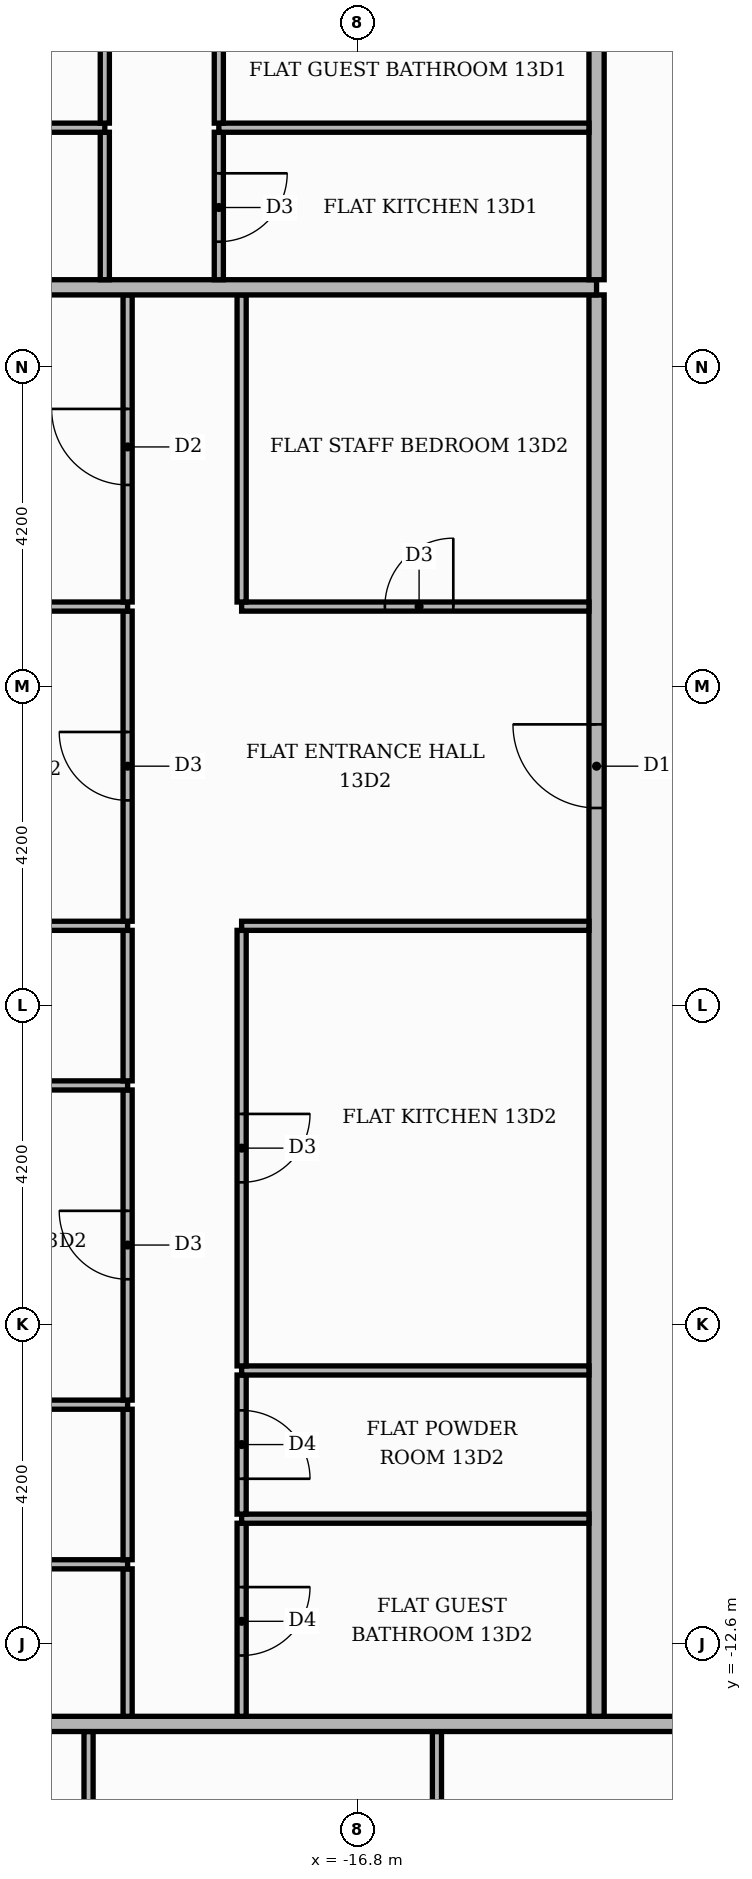
"""IFC4 building model, lengths in metres.
Left out: names, types, materials, properties, quantities, classifications, styles, units other than length and angle.
Written with IfcOpenShell. Run it as: python <this file> out.ifc"""

import sys

from ifc_helpers import new_model, si_unit, direction, frame, frame_2d, origin, place, context, subcontext, project, spatial, rectangle, extrude, element, fill, save


model = new_model("IFC4")
c1 = context("Model", 3, precision=1e-05, world=origin(), true_north=direction((0.0, 1.0)))
c2 = subcontext(c1, "Body", "Model", "MODEL_VIEW")
j1 = project(units=[si_unit("LENGTHUNIT", "METRE"), si_unit("PLANEANGLEUNIT", "RADIAN")], contexts=[c1])
p1 = place(None, origin())
s1 = spatial("IfcSite", under=j1, at=p1, CompositionType="ELEMENT")
p2 = place(p1, origin())
s2 = spatial("IfcBuilding", under=s1, at=p2, CompositionType="ELEMENT")
p3 = place(p2, frame((0.0, 0.0, 58.2)))
s3 = spatial("IfcBuildingStorey", under=s2, at=p3, CompositionType="ELEMENT", Elevation=58.2)
p4 = place(p3, frame((-20.334, -20.66, 0.0), z_axis=(0.0, 0.0, 1.0), x_axis=(0.0, 1.0, 0.0)))
e1 = element("IfcWall", 1, at=p4, inside=s3, PredefinedType="PARTITIONING", context=c2, shape_type="SweptSolid", body=[
    extrude(rectangle(XDim=6.91, YDim=0.12, at=frame_2d((3.455, 0.0))), origin(), (0.0, 0.0, 1.0), 3.48),
])
p5 = place(p4, frame((4.792, 0.0, 0.0)))
e2 = element("IfcOpeningElement", 2, at=p5, cuts=e1, PredefinedType="OPENING", context=c2, shape_type="SweptSolid", body=[
    extrude(rectangle(XDim=0.9, YDim=2.1, at=frame_2d((0.45, 1.05))), frame((0.0, 0.07, 0.0), z_axis=(0.0, -1.0, 0.0), x_axis=(1.0, 0.0, 0.0)), (0.0, 0.0, 1.0), 0.14),
])
p6 = place(p3, frame((-15.75, -20.66, 0.0), z_axis=(0.0, 0.0, 1.0), x_axis=(0.0, 1.0, 0.0)))
e3 = element("IfcWall", 3, at=p6, inside=s3, PredefinedType="PARTITIONING", context=c2, shape_type="SweptSolid", body=[
    extrude(rectangle(XDim=6.91, YDim=0.12, at=frame_2d((3.455, 0.0))), origin(), (0.0, 0.0, 1.0), 3.48),
])
p7 = place(p6, frame((2.975, 0.0, 0.0)))
e4 = element("IfcOpeningElement", 4, at=p7, cuts=e3, PredefinedType="OPENING", context=c2, shape_type="SweptSolid", body=[
    extrude(rectangle(XDim=1.0, YDim=2.1, at=frame_2d((0.5, 1.05))), frame((0.0, 0.07, 0.0), z_axis=(0.0, -1.0, 0.0), x_axis=(1.0, 0.0, 0.0)), (0.0, 0.0, 1.0), 0.14),
])
p8 = place(p3, frame((-25.42, -13.65, 0.0), z_axis=(0.0, 0.0, 1.0), x_axis=(1.0, 0.0, 0.0)))
e5 = element("IfcWall", 5, at=p8, inside=s3, PredefinedType="PARTITIONING", context=c2, shape_type="SweptSolid", body=[
    extrude(rectangle(XDim=39.07, YDim=0.2, at=frame_2d((19.535, 0.0))), origin(), (0.0, 0.0, 1.0), 3.48),
])
p9 = place(p8, frame((13.32, 0.0, 0.0)))
e6 = element("IfcOpeningElement", 6, at=p9, cuts=e5, PredefinedType="OPENING", context=c2, shape_type="SweptSolid", body=[
    extrude(rectangle(XDim=1.1, YDim=2.4, at=frame_2d((0.55, 1.2))), frame((0.0, 0.11, 0.0), z_axis=(0.0, -1.0, 0.0), x_axis=(1.0, 0.0, 0.0)), (0.0, 0.0, 1.0), 0.22),
])
p10 = place(p8, frame((25.92, 0.0, 0.0)))
e7 = element("IfcOpeningElement", 7, at=p10, cuts=e5, PredefinedType="OPENING", context=c2, shape_type="SweptSolid", body=[
    extrude(rectangle(XDim=1.1, YDim=2.4, at=frame_2d((0.55, 1.2))), frame((0.0, 0.11, 0.0), z_axis=(0.0, -1.0, 0.0), x_axis=(1.0, 0.0, 0.0)), (0.0, 0.0, 1.0), 0.22),
])
p11 = place(p3, frame((-19.82, -13.55, 0.0), z_axis=(0.0, 0.0, 1.0), x_axis=(0.0, 1.0, 0.0)))
e8 = element("IfcWall", 8, at=p11, inside=s3, PredefinedType="PARTITIONING", context=c2, shape_type="SweptSolid", body=[
    extrude(rectangle(XDim=1.94, YDim=0.12, at=frame_2d((0.97, 0.0))), origin(), (0.0, 0.0, 1.0), 3.48),
])
p12 = place(p3, frame((-18.32, -13.55, 0.0), z_axis=(0.0, 0.0, 1.0), x_axis=(0.0, 1.0, 0.0)))
e9 = element("IfcWall", 9, at=p12, inside=s3, PredefinedType="PARTITIONING", context=c2, shape_type="SweptSolid", body=[
    extrude(rectangle(XDim=2.54, YDim=0.12, at=frame_2d((1.27, 0.0))), origin(), (0.0, 0.0, 1.0), 3.48),
])
p13 = place(p12, frame((0.8, 0.0, 0.0)))
e10 = element("IfcOpeningElement", 10, at=p13, cuts=e9, PredefinedType="OPENING", context=c2, shape_type="SweptSolid", body=[
    extrude(rectangle(XDim=0.9, YDim=2.1, at=frame_2d((0.45, 1.05))), frame((0.0, 0.07, 0.0), z_axis=(0.0, -1.0, 0.0), x_axis=(1.0, 0.0, 0.0)), (0.0, 0.0, 1.0), 0.14),
])
p14 = place(p3, frame((-13.65, -13.55, 0.0), z_axis=(0.0, 0.0, 1.0), x_axis=(0.0, 1.0, 0.0)))
e11 = element("IfcWall", 11, at=p14, inside=s3, PredefinedType="PARTITIONING", context=c2, shape_type="SweptSolid", body=[
    extrude(rectangle(XDim=18.7, YDim=0.2, at=frame_2d((9.35, 0.0))), origin(), (0.0, 0.0, 1.0), 3.48),
])
p15 = place(p14, frame((11.95, 0.0, 0.0)))
e12 = element("IfcOpeningElement", 12, at=p15, cuts=e11, PredefinedType="OPENING", context=c2, shape_type="SweptSolid", body=[
    extrude(rectangle(XDim=1.1, YDim=2.4, at=frame_2d((0.55, 1.2))), frame((0.0, 0.11, 0.0), z_axis=(0.0, -1.0, 0.0), x_axis=(1.0, 0.0, 0.0)), (0.0, 0.0, 1.0), 0.22),
])
p16 = place(p3, frame((-25.42, -11.55, 0.0), z_axis=(0.0, 0.0, 1.0), x_axis=(1.0, 0.0, 0.0)))
e13 = element("IfcWall", 13, at=p16, inside=s3, PredefinedType="PARTITIONING", context=c2, shape_type="SweptSolid", body=[
    extrude(rectangle(XDim=5.6, YDim=0.12, at=frame_2d((2.8, 0.0))), origin(), (0.0, 0.0, 1.0), 3.48),
])
p17 = place(p16, frame((2.2, 0.0, 0.0)))
e14 = element("IfcOpeningElement", 14, at=p17, cuts=e13, PredefinedType="OPENING", context=c2, shape_type="SweptSolid", body=[
    extrude(rectangle(XDim=0.9, YDim=2.1, at=frame_2d((0.45, 1.05))), frame((0.0, 0.07, 0.0), z_axis=(0.0, -1.0, 0.0), x_axis=(1.0, 0.0, 0.0)), (0.0, 0.0, 1.0), 0.14),
])
p18 = place(p3, frame((-19.82, -11.49, 0.0), z_axis=(0.0, 0.0, 1.0), x_axis=(0.0, 1.0, 0.0)))
e15 = element("IfcWall", 15, at=p18, inside=s3, PredefinedType="PARTITIONING", context=c2, shape_type="SweptSolid", body=[
    extrude(rectangle(XDim=1.98, YDim=0.12, at=frame_2d((0.99, 0.0))), origin(), (0.0, 0.0, 1.0), 3.48),
])
p19 = place(p3, frame((-18.32, -10.95, 0.0), z_axis=(0.0, 0.0, 1.0), x_axis=(1.0, 0.0, 0.0)))
e16 = element("IfcWall", 16, at=p19, inside=s3, PredefinedType="PARTITIONING", context=c2, shape_type="SweptSolid", body=[
    extrude(rectangle(XDim=4.57, YDim=0.12, at=frame_2d((2.285, 0.0))), origin(), (0.0, 0.0, 1.0), 3.48),
])
p20 = place(p3, frame((-18.32, -10.89, 0.0), z_axis=(0.0, 0.0, 1.0), x_axis=(0.0, 1.0, 0.0)))
e17 = element("IfcWall", 17, at=p20, inside=s3, PredefinedType="PARTITIONING", context=c2, shape_type="SweptSolid", body=[
    extrude(rectangle(XDim=1.83, YDim=0.12, at=frame_2d((0.915, 0.0))), origin(), (0.0, 0.0, 1.0), 3.48),
])
p21 = place(p20, frame((0.465, 0.0, 0.0)))
e18 = element("IfcOpeningElement", 18, at=p21, cuts=e17, PredefinedType="OPENING", context=c2, shape_type="SweptSolid", body=[
    extrude(rectangle(XDim=0.9, YDim=2.1, at=frame_2d((0.45, 1.05))), frame((0.0, 0.07, 0.0), z_axis=(0.0, -1.0, 0.0), x_axis=(1.0, 0.0, 0.0)), (0.0, 0.0, 1.0), 0.14),
])
p22 = place(p3, frame((-25.42, -9.45, 0.0), z_axis=(0.0, 0.0, 1.0), x_axis=(1.0, 0.0, 0.0)))
e19 = element("IfcWall", 19, at=p22, inside=s3, PredefinedType="PARTITIONING", context=c2, shape_type="SweptSolid", body=[
    extrude(rectangle(XDim=5.6, YDim=0.12, at=frame_2d((2.8, 0.0))), origin(), (0.0, 0.0, 1.0), 3.48),
])
p23 = place(p22, frame((2.2, 0.0, 0.0)))
e20 = element("IfcOpeningElement", 20, at=p23, cuts=e19, PredefinedType="OPENING", context=c2, shape_type="SweptSolid", body=[
    extrude(rectangle(XDim=0.9, YDim=2.1, at=frame_2d((0.45, 1.05))), frame((0.0, 0.07, 0.0), z_axis=(0.0, -1.0, 0.0), x_axis=(1.0, 0.0, 0.0)), (0.0, 0.0, 1.0), 0.14),
])
p24 = place(p3, frame((-19.82, -9.39, 0.0), z_axis=(0.0, 0.0, 1.0), x_axis=(0.0, 1.0, 0.0)))
e21 = element("IfcWall", 21, at=p24, inside=s3, PredefinedType="PARTITIONING", context=c2, shape_type="SweptSolid", body=[
    extrude(rectangle(XDim=4.08, YDim=0.12, at=frame_2d((2.04, 0.0))), origin(), (0.0, 0.0, 1.0), 3.48),
])
p25 = place(p24, frame((1.59, 0.0, 0.0)))
e22 = element("IfcOpeningElement", 22, at=p25, cuts=e21, PredefinedType="OPENING", context=c2, shape_type="SweptSolid", body=[
    extrude(rectangle(XDim=0.9, YDim=2.1, at=frame_2d((0.45, 1.05))), frame((0.0, 0.07, 0.0), z_axis=(0.0, -1.0, 0.0), x_axis=(1.0, 0.0, 0.0)), (0.0, 0.0, 1.0), 0.14),
])
p26 = place(p3, frame((-18.32, -9.0, 0.0), z_axis=(0.0, 0.0, 1.0), x_axis=(1.0, 0.0, 0.0)))
e23 = element("IfcWall", 23, at=p26, inside=s3, PredefinedType="PARTITIONING", context=c2, shape_type="SweptSolid", body=[
    extrude(rectangle(XDim=4.57, YDim=0.12, at=frame_2d((2.285, 0.0))), origin(), (0.0, 0.0, 1.0), 3.48),
])
p27 = place(p3, frame((-18.32, -8.94, 0.0), z_axis=(0.0, 0.0, 1.0), x_axis=(0.0, 1.0, 0.0)))
e24 = element("IfcWall", 24, at=p27, inside=s3, PredefinedType="PARTITIONING", context=c2, shape_type="SweptSolid", body=[
    extrude(rectangle(XDim=5.73, YDim=0.12, at=frame_2d((2.865, 0.0))), origin(), (0.0, 0.0, 1.0), 3.48),
])
p28 = place(p27, frame((2.415, 0.0, 0.0)))
e25 = element("IfcOpeningElement", 25, at=p28, cuts=e24, PredefinedType="OPENING", context=c2, shape_type="SweptSolid", body=[
    extrude(rectangle(XDim=0.9, YDim=2.1, at=frame_2d((0.45, 1.05))), frame((0.0, 0.07, 0.0), z_axis=(0.0, -1.0, 0.0), x_axis=(1.0, 0.0, 0.0)), (0.0, 0.0, 1.0), 0.14),
])
p29 = place(p3, frame((-25.42, -5.25, 0.0), z_axis=(0.0, 0.0, 1.0), x_axis=(1.0, 0.0, 0.0)))
e26 = element("IfcWall", 26, at=p29, inside=s3, PredefinedType="PARTITIONING", context=c2, shape_type="SweptSolid", body=[
    extrude(rectangle(XDim=5.6, YDim=0.12, at=frame_2d((2.8, 0.0))), origin(), (0.0, 0.0, 1.0), 3.48),
])
p30 = place(p3, frame((-19.82, -5.19, 0.0), z_axis=(0.0, 0.0, 1.0), x_axis=(0.0, 1.0, 0.0)))
e27 = element("IfcWall", 27, at=p30, inside=s3, PredefinedType="PARTITIONING", context=c2, shape_type="SweptSolid", body=[
    extrude(rectangle(XDim=1.98, YDim=0.12, at=frame_2d((0.99, 0.0))), origin(), (0.0, 0.0, 1.0), 3.48),
])
p31 = place(p3, frame((-25.42, -3.15, 0.0), z_axis=(0.0, 0.0, 1.0), x_axis=(1.0, 0.0, 0.0)))
e28 = element("IfcWall", 28, at=p31, inside=s3, PredefinedType="PARTITIONING", context=c2, shape_type="SweptSolid", body=[
    extrude(rectangle(XDim=5.6, YDim=0.12, at=frame_2d((2.8, 0.0))), origin(), (0.0, 0.0, 1.0), 3.48),
])
p32 = place(p31, frame((2.2, 0.0, 0.0)))
e29 = element("IfcOpeningElement", 29, at=p32, cuts=e28, PredefinedType="OPENING", context=c2, shape_type="SweptSolid", body=[
    extrude(rectangle(XDim=0.9, YDim=2.1, at=frame_2d((0.45, 1.05))), frame((0.0, 0.07, 0.0), z_axis=(0.0, -1.0, 0.0), x_axis=(1.0, 0.0, 0.0)), (0.0, 0.0, 1.0), 0.14),
])
p33 = place(p3, frame((-18.32, -3.15, 0.0), z_axis=(0.0, 0.0, 1.0), x_axis=(1.0, 0.0, 0.0)))
e30 = element("IfcWall", 30, at=p33, inside=s3, PredefinedType="PARTITIONING", context=c2, shape_type="SweptSolid", body=[
    extrude(rectangle(XDim=4.57, YDim=0.12, at=frame_2d((2.285, 0.0))), origin(), (0.0, 0.0, 1.0), 3.48),
])
p34 = place(p3, frame((-19.82, -3.09, 0.0), z_axis=(0.0, 0.0, 1.0), x_axis=(0.0, 1.0, 0.0)))
e31 = element("IfcWall", 31, at=p34, inside=s3, PredefinedType="PARTITIONING", context=c2, shape_type="SweptSolid", body=[
    extrude(rectangle(XDim=4.08, YDim=0.12, at=frame_2d((2.04, 0.0))), origin(), (0.0, 0.0, 1.0), 3.48),
])
p35 = place(p34, frame((1.59, 0.0, 0.0)))
e32 = element("IfcOpeningElement", 32, at=p35, cuts=e31, PredefinedType="OPENING", context=c2, shape_type="SweptSolid", body=[
    extrude(rectangle(XDim=0.9, YDim=2.1, at=frame_2d((0.45, 1.05))), frame((0.0, 0.07, 0.0), z_axis=(0.0, -1.0, 0.0), x_axis=(1.0, 0.0, 0.0)), (0.0, 0.0, 1.0), 0.14),
])
p36 = place(p3, frame((-25.42, 1.05, 0.0), z_axis=(0.0, 0.0, 1.0), x_axis=(1.0, 0.0, 0.0)))
e33 = element("IfcWall", 33, at=p36, inside=s3, PredefinedType="PARTITIONING", context=c2, shape_type="SweptSolid", body=[
    extrude(rectangle(XDim=5.6, YDim=0.12, at=frame_2d((2.8, 0.0))), origin(), (0.0, 0.0, 1.0), 3.48),
])
p37 = place(p3, frame((-18.32, 1.05, 0.0), z_axis=(0.0, 0.0, 1.0), x_axis=(1.0, 0.0, 0.0)))
e34 = element("IfcWall", 34, at=p37, inside=s3, PredefinedType="PARTITIONING", context=c2, shape_type="SweptSolid", body=[
    extrude(rectangle(XDim=4.57, YDim=0.12, at=frame_2d((2.285, 0.0))), origin(), (0.0, 0.0, 1.0), 3.48),
])
p38 = place(p37, frame((1.885, 0.0, 0.0)))
e35 = element("IfcOpeningElement", 35, at=p38, cuts=e34, PredefinedType="OPENING", context=c2, shape_type="SweptSolid", body=[
    extrude(rectangle(XDim=0.9, YDim=2.1, at=frame_2d((0.45, 1.05))), frame((0.0, 0.07, 0.0), z_axis=(0.0, -1.0, 0.0), x_axis=(1.0, 0.0, 0.0)), (0.0, 0.0, 1.0), 0.14),
])
p39 = place(p3, frame((-19.82, 1.11, 0.0), z_axis=(0.0, 0.0, 1.0), x_axis=(0.0, 1.0, 0.0)))
e36 = element("IfcWall", 36, at=p39, inside=s3, PredefinedType="PARTITIONING", context=c2, shape_type="SweptSolid", body=[
    extrude(rectangle(XDim=4.04, YDim=0.12, at=frame_2d((2.02, 0.0))), origin(), (0.0, 0.0, 1.0), 3.48),
])
p40 = place(p39, frame((1.54, 0.0, 0.0)))
e37 = element("IfcOpeningElement", 37, at=p40, cuts=e36, PredefinedType="OPENING", context=c2, shape_type="SweptSolid", body=[
    extrude(rectangle(XDim=1.0, YDim=2.1, at=frame_2d((0.5, 1.05))), frame((0.0, 0.07, 0.0), z_axis=(0.0, -1.0, 0.0), x_axis=(1.0, 0.0, 0.0)), (0.0, 0.0, 1.0), 0.14),
])
p41 = place(p3, frame((-18.32, 1.11, 0.0), z_axis=(0.0, 0.0, 1.0), x_axis=(0.0, 1.0, 0.0)))
e38 = element("IfcWall", 38, at=p41, inside=s3, PredefinedType="PARTITIONING", context=c2, shape_type="SweptSolid", body=[
    extrude(rectangle(XDim=4.04, YDim=0.12, at=frame_2d((2.02, 0.0))), origin(), (0.0, 0.0, 1.0), 3.48),
])
p42 = place(p3, frame((-25.42, 5.25, 0.0), z_axis=(0.0, 0.0, 1.0), x_axis=(1.0, 0.0, 0.0)))
e39 = element("IfcWall", 39, at=p42, inside=s3, PredefinedType="PARTITIONING", context=c2, shape_type="SweptSolid", body=[
    extrude(rectangle(XDim=11.77, YDim=0.2, at=frame_2d((5.885, 0.0))), origin(), (0.0, 0.0, 1.0), 3.48),
])
p43 = place(p3, frame((-20.12, 5.35, 0.0), z_axis=(0.0, 0.0, 1.0), x_axis=(0.0, 1.0, 0.0)))
e40 = element("IfcWall", 40, at=p43, inside=s3, PredefinedType="PARTITIONING", context=c2, shape_type="SweptSolid", body=[
    extrude(rectangle(XDim=1.94, YDim=0.12, at=frame_2d((0.97, 0.0))), origin(), (0.0, 0.0, 1.0), 3.48),
])
p44 = place(p3, frame((-18.62, 5.35, 0.0), z_axis=(0.0, 0.0, 1.0), x_axis=(0.0, 1.0, 0.0)))
e41 = element("IfcWall", 41, at=p44, inside=s3, PredefinedType="PARTITIONING", context=c2, shape_type="SweptSolid", body=[
    extrude(rectangle(XDim=1.94, YDim=0.12, at=frame_2d((0.97, 0.0))), origin(), (0.0, 0.0, 1.0), 3.48),
])
p45 = place(p44, frame((0.5, 0.0, 0.0)))
e42 = element("IfcOpeningElement", 42, at=p45, cuts=e41, PredefinedType="OPENING", context=c2, shape_type="SweptSolid", body=[
    extrude(rectangle(XDim=0.9, YDim=2.1, at=frame_2d((0.45, 1.05))), frame((0.0, 0.07, 0.0), z_axis=(0.0, -1.0, 0.0), x_axis=(1.0, 0.0, 0.0)), (0.0, 0.0, 1.0), 0.14),
])
p46 = place(p3, frame((-13.65, 5.35, 0.0), z_axis=(0.0, 0.0, 1.0), x_axis=(0.0, 1.0, 0.0)))
e43 = element("IfcWall", 43, at=p46, inside=s3, PredefinedType="PARTITIONING", context=c2, shape_type="SweptSolid", body=[
    extrude(rectangle(XDim=8.2, YDim=0.2, at=frame_2d((4.1, 0.0))), origin(), (0.0, 0.0, 1.0), 3.48),
])
p47 = place(p46, frame((5.65, 0.0, 0.0)))
e44 = element("IfcOpeningElement", 44, at=p47, cuts=e43, PredefinedType="OPENING", context=c2, shape_type="SweptSolid", body=[
    extrude(rectangle(XDim=1.1, YDim=2.4, at=frame_2d((0.55, 1.2))), frame((0.0, 0.11, 0.0), z_axis=(0.0, -1.0, 0.0), x_axis=(1.0, 0.0, 0.0)), (0.0, 0.0, 1.0), 0.22),
])
p48 = place(p3, frame((-25.42, 7.35, 0.0), z_axis=(0.0, 0.0, 1.0), x_axis=(1.0, 0.0, 0.0)))
e45 = element("IfcWall", 45, at=p48, inside=s3, PredefinedType="PARTITIONING", context=c2, shape_type="SweptSolid", body=[
    extrude(rectangle(XDim=5.3, YDim=0.12, at=frame_2d((2.65, 0.0))), origin(), (0.0, 0.0, 1.0), 3.48),
])
p49 = place(p48, frame((2.05, 0.0, 0.0)))
e46 = element("IfcOpeningElement", 46, at=p49, cuts=e45, PredefinedType="OPENING", context=c2, shape_type="SweptSolid", body=[
    extrude(rectangle(XDim=0.9, YDim=2.1, at=frame_2d((0.45, 1.05))), frame((0.0, 0.07, 0.0), z_axis=(0.0, -1.0, 0.0), x_axis=(1.0, 0.0, 0.0)), (0.0, 0.0, 1.0), 0.14),
])
p50 = place(p3, frame((-18.62, 7.35, 0.0), z_axis=(0.0, 0.0, 1.0), x_axis=(1.0, 0.0, 0.0)))
e47 = element("IfcWall", 47, at=p50, inside=s3, PredefinedType="PARTITIONING", context=c2, shape_type="SweptSolid", body=[
    extrude(rectangle(XDim=4.87, YDim=0.12, at=frame_2d((2.435, 0.0))), origin(), (0.0, 0.0, 1.0), 3.48),
])
for number, where, z_axis, x_axis in (
    (48, (-20.12, 7.41, 0.0), (0.0, 0.0, 1.0), (0.0, 1.0, 0.0)),
    (49, (-18.62, 7.41, 0.0), (0.0, 0.0, 1.0), (0.0, 1.0, 0.0)),
):
    element("IfcWall", number, at=place(p3, frame(where, z_axis=z_axis, x_axis=x_axis)), inside=s3, PredefinedType="PARTITIONING", context=c2, shape_type="SweptSolid", body=[
        extrude(rectangle(XDim=1.98, YDim=0.12, at=frame_2d((0.99, 0.0))), origin(), (0.0, 0.0, 1.0), 3.48),
    ])
p51 = place(p45, frame((0.9, 0.0, 0.0), z_axis=(0.0, 0.0, 1.0), x_axis=(-1.0, 0.0, 0.0)))
e50 = element("IfcDoor", 50, at=p51, inside=s3, OperationType="SINGLE_SWING_RIGHT", PredefinedType="DOOR", context=c2, shape_type="SweptSolid", body=[
    extrude(rectangle(XDim=0.9, YDim=2.1, at=frame_2d((0.45, 1.05))), frame((0.0, 0.025, 0.0), z_axis=(0.0, -1.0, 0.0), x_axis=(1.0, 0.0, 0.0)), (0.0, 0.0, 1.0), 0.05),
])
fill(e42, e50)
p52 = place(p15, origin())
e51 = element("IfcDoor", 51, at=p52, inside=s3, OperationType="SINGLE_SWING_RIGHT", PredefinedType="DOOR", context=c2, shape_type="SweptSolid", body=[
    extrude(rectangle(XDim=1.1, YDim=2.4, at=frame_2d((0.55, 1.2))), frame((0.0, 0.025, 0.0), z_axis=(0.0, -1.0, 0.0), x_axis=(1.0, 0.0, 0.0)), (0.0, 0.0, 1.0), 0.05),
])
fill(e12, e51)
p53 = place(p38, origin())
e52 = element("IfcDoor", 52, at=p53, inside=s3, OperationType="SINGLE_SWING_RIGHT", PredefinedType="DOOR", context=c2, shape_type="SweptSolid", body=[
    extrude(rectangle(XDim=0.9, YDim=2.1, at=frame_2d((0.45, 1.05))), frame((0.0, 0.025, 0.0), z_axis=(0.0, -1.0, 0.0), x_axis=(1.0, 0.0, 0.0)), (0.0, 0.0, 1.0), 0.05),
])
fill(e35, e52)
p54 = place(p28, frame((0.9, 0.0, 0.0), z_axis=(0.0, 0.0, 1.0), x_axis=(-1.0, 0.0, 0.0)))
e53 = element("IfcDoor", 53, at=p54, inside=s3, OperationType="SINGLE_SWING_RIGHT", PredefinedType="DOOR", context=c2, shape_type="SweptSolid", body=[
    extrude(rectangle(XDim=0.9, YDim=2.1, at=frame_2d((0.45, 1.05))), frame((0.0, 0.025, 0.0), z_axis=(0.0, -1.0, 0.0), x_axis=(1.0, 0.0, 0.0)), (0.0, 0.0, 1.0), 0.05),
])
fill(e25, e53)
p55 = place(p21, frame((0.9, 0.0, 0.0), z_axis=(0.0, 0.0, 1.0), x_axis=(-1.0, 0.0, 0.0)))
e54 = element("IfcDoor", 54, at=p55, inside=s3, OperationType="SINGLE_SWING_LEFT", PredefinedType="DOOR", context=c2, shape_type="SweptSolid", body=[
    extrude(rectangle(XDim=0.9, YDim=2.1, at=frame_2d((0.45, 1.05))), frame((0.0, 0.025, 0.0), z_axis=(0.0, -1.0, 0.0), x_axis=(1.0, 0.0, 0.0)), (0.0, 0.0, 1.0), 0.05),
])
fill(e18, e54)
p56 = place(p13, frame((0.9, 0.0, 0.0), z_axis=(0.0, 0.0, 1.0), x_axis=(-1.0, 0.0, 0.0)))
e55 = element("IfcDoor", 55, at=p56, inside=s3, OperationType="SINGLE_SWING_RIGHT", PredefinedType="DOOR", context=c2, shape_type="SweptSolid", body=[
    extrude(rectangle(XDim=0.9, YDim=2.1, at=frame_2d((0.45, 1.05))), frame((0.0, 0.025, 0.0), z_axis=(0.0, -1.0, 0.0), x_axis=(1.0, 0.0, 0.0)), (0.0, 0.0, 1.0), 0.05),
])
fill(e10, e55)
p57 = place(p40, origin())
e56 = element("IfcDoor", 56, at=p57, inside=s3, OperationType="SINGLE_SWING_RIGHT", PredefinedType="DOOR", context=c2, shape_type="SweptSolid", body=[
    extrude(rectangle(XDim=1.0, YDim=2.1, at=frame_2d((0.5, 1.05))), frame((0.0, 0.025, 0.0), z_axis=(0.0, -1.0, 0.0), x_axis=(1.0, 0.0, 0.0)), (0.0, 0.0, 1.0), 0.05),
])
fill(e37, e56)
p58 = place(p35, origin())
e57 = element("IfcDoor", 57, at=p58, inside=s3, OperationType="SINGLE_SWING_RIGHT", PredefinedType="DOOR", context=c2, shape_type="SweptSolid", body=[
    extrude(rectangle(XDim=0.9, YDim=2.1, at=frame_2d((0.45, 1.05))), frame((0.0, 0.025, 0.0), z_axis=(0.0, -1.0, 0.0), x_axis=(1.0, 0.0, 0.0)), (0.0, 0.0, 1.0), 0.05),
])
fill(e32, e57)
p59 = place(p25, origin())
e58 = element("IfcDoor", 58, at=p59, inside=s3, OperationType="SINGLE_SWING_RIGHT", PredefinedType="DOOR", context=c2, shape_type="SweptSolid", body=[
    extrude(rectangle(XDim=0.9, YDim=2.1, at=frame_2d((0.45, 1.05))), frame((0.0, 0.025, 0.0), z_axis=(0.0, -1.0, 0.0), x_axis=(1.0, 0.0, 0.0)), (0.0, 0.0, 1.0), 0.05),
])
fill(e22, e58)
save(model, sys.argv[1])
